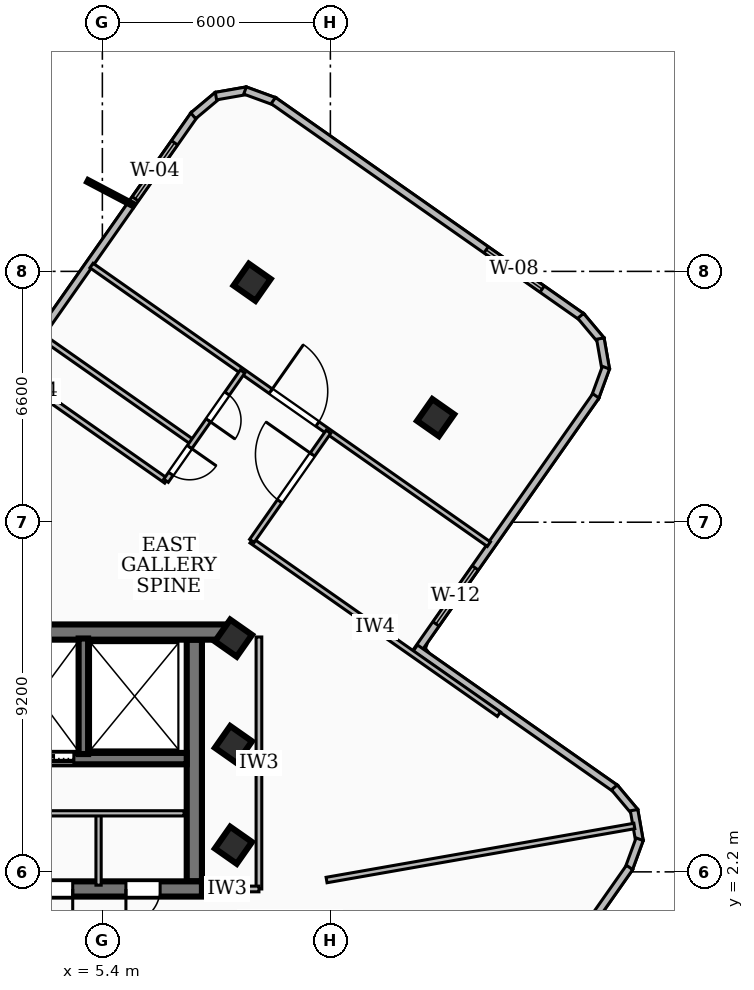
"""IFC4 building model, lengths in metres.
Left out: names, types, materials, properties, quantities, classifications, styles, units other than length and angle.
Written with IfcOpenShell. Run it as: python <this file> out.ifc"""

import sys

from ifc_helpers import new_model, si_unit, direction, frame, frame_2d, origin, origin_2d, place, context, subcontext, project, spatial, rectangle, extrude, element, fill, save


model = new_model("IFC4")
c1 = context("Model", 3, precision=1e-05, world=origin(), true_north=direction((0.0, 1.0)))
c2 = subcontext(c1, "Body", "Model", "MODEL_VIEW")
j1 = project(units=[si_unit("LENGTHUNIT", "METRE"), si_unit("PLANEANGLEUNIT", "RADIAN")], contexts=[c1])
p1 = place(None, origin())
s1 = spatial("IfcSite", under=j1, at=p1, CompositionType="ELEMENT")
p2 = place(p1, origin())
s2 = spatial("IfcBuilding", under=s1, at=p2, CompositionType="ELEMENT")
p3 = place(p2, frame((0.0, 0.0, 264.6)))
s3 = spatial("IfcBuildingStorey", under=s2, at=p3, CompositionType="ELEMENT", Elevation=264.6)
p4 = place(p3, frame((-8.78, 8.51, 0.0), z_axis=(0.0, 0.0, 1.0), x_axis=(1.0, 0.0, 0.0)))
e1 = element("IfcWall", 1, at=p4, inside=s3, PredefinedType="SHEAR", context=c2, shape_type="SweptSolid", body=[
    extrude(rectangle(XDim=17.56, YDim=0.4, at=frame_2d((8.78, 0.0))), origin(), (0.0, 0.0, 1.0), 3.16),
])
p5 = place(p3, frame((8.02, 1.75, 0.0), z_axis=(0.0, 0.0, 1.0), x_axis=(-1.0, 0.0, 0.0)))
e2 = element("IfcWall", 2, at=p5, inside=s3, PredefinedType="SHEAR", context=c2, shape_type="SweptSolid", body=[
    extrude(rectangle(XDim=16.04, YDim=0.4, at=frame_2d((8.02, 0.0))), origin(), (0.0, 0.0, 1.0), 3.16),
])
p6 = place(p5, frame((7.45, 0.0, 0.0)))
e3 = element("IfcOpeningElement", 3, at=p6, cuts=e2, PredefinedType="OPENING", context=c2, shape_type="SweptSolid", body=[
    extrude(rectangle(XDim=1.0, YDim=2.1, at=frame_2d((0.5, 1.05))), frame((0.0, 0.21, 0.0), z_axis=(0.0, -1.0, 0.0), x_axis=(1.0, 0.0, 0.0)), (0.0, 0.0, 1.0), 0.42),
])
p7 = place(p5, frame((14.285, 0.0, 0.0)))
e4 = element("IfcOpeningElement", 4, at=p7, cuts=e2, PredefinedType="OPENING", context=c2, shape_type="SweptSolid", body=[
    extrude(rectangle(XDim=1.05, YDim=2.15, at=frame_2d((0.525, 1.075))), frame((0.0, 0.21, 0.0), z_axis=(0.0, -1.0, 0.0), x_axis=(1.0, 0.0, 0.0)), (0.0, 0.0, 1.0), 0.42),
])
p8 = place(p5, frame((12.725, 0.0, 0.0)))
e5 = element("IfcOpeningElement", 5, at=p8, cuts=e2, PredefinedType="OPENING", context=c2, shape_type="SweptSolid", body=[
    extrude(rectangle(XDim=1.05, YDim=2.15, at=frame_2d((0.525, 1.075))), frame((0.0, 0.21, 0.0), z_axis=(0.0, -1.0, 0.0), x_axis=(1.0, 0.0, 0.0)), (0.0, 0.0, 1.0), 0.42),
])
p9 = place(p5, frame((11.165, 0.0, 0.0)))
e6 = element("IfcOpeningElement", 6, at=p9, cuts=e2, PredefinedType="OPENING", context=c2, shape_type="SweptSolid", body=[
    extrude(rectangle(XDim=1.05, YDim=2.15, at=frame_2d((0.525, 1.075))), frame((0.0, 0.21, 0.0), z_axis=(0.0, -1.0, 0.0), x_axis=(1.0, 0.0, 0.0)), (0.0, 0.0, 1.0), 0.42),
])
p10 = place(p5, frame((3.4, 0.0, 0.0)))
e7 = element("IfcOpeningElement", 7, at=p10, cuts=e2, PredefinedType="OPENING", context=c2, shape_type="SweptSolid", body=[
    extrude(rectangle(XDim=0.9, YDim=2.06, at=frame_2d((0.45, 1.03))), frame((0.0, 0.21, 0.0), z_axis=(0.0, -1.0, 0.0), x_axis=(1.0, 0.0, 0.0)), (0.0, 0.0, 1.0), 0.42),
])
p11 = place(p5, frame((1.1, 0.0, 0.0)))
e8 = element("IfcOpeningElement", 8, at=p11, cuts=e2, PredefinedType="OPENING", context=c2, shape_type="SweptSolid", body=[
    extrude(rectangle(XDim=0.9, YDim=2.06, at=frame_2d((0.45, 1.03))), frame((0.0, 0.21, 0.0), z_axis=(0.0, -1.0, 0.0), x_axis=(1.0, 0.0, 0.0)), (0.0, 0.0, 1.0), 0.42),
])
p12 = place(p3, frame((7.82, 8.31, 0.0), z_axis=(0.0, 0.0, 1.0), x_axis=(0.0, -1.0, 0.0)))
e9 = element("IfcWall", 9, at=p12, inside=s3, PredefinedType="SHEAR", context=c2, shape_type="SweptSolid", body=[
    extrude(rectangle(XDim=6.36, YDim=0.4, at=frame_2d((3.18, 0.0))), origin(), (0.0, 0.0, 1.0), 3.16),
])
p13 = place(p3, frame((7.62, 5.18, 0.0), z_axis=(0.0, 0.0, 1.0), x_axis=(-1.0, 0.0, 0.0)))
e10 = element("IfcWall", 10, at=p13, inside=s3, PredefinedType="SOLIDWALL", context=c2, shape_type="SweptSolid", body=[
    extrude(rectangle(XDim=15.24, YDim=0.3, at=frame_2d((7.62, 0.0))), origin(), (0.0, 0.0, 1.0), 3.16),
])
p14 = place(p13, frame((5.77, 0.0, 0.0)))
e11 = element("IfcOpeningElement", 11, at=p14, cuts=e10, PredefinedType="OPENING", context=c2, shape_type="SweptSolid", body=[
    extrude(rectangle(XDim=1.1, YDim=2.15, at=frame_2d((0.55, 1.075))), frame((0.0, 0.16, 0.0), z_axis=(0.0, -1.0, 0.0), x_axis=(1.0, 0.0, 0.0)), (0.0, 0.0, 1.0), 0.32),
])
p15 = place(p13, frame((2.97, 0.0, 0.0)))
e12 = element("IfcOpeningElement", 12, at=p15, cuts=e10, PredefinedType="OPENING", context=c2, shape_type="SweptSolid", body=[
    extrude(rectangle(XDim=1.1, YDim=2.15, at=frame_2d((0.55, 1.075))), frame((0.0, 0.16, 0.0), z_axis=(0.0, -1.0, 0.0), x_axis=(1.0, 0.0, 0.0)), (0.0, 0.0, 1.0), 0.32),
])
p16 = place(p13, frame((7.97, 0.0, 0.0)))
e13 = element("IfcOpeningElement", 13, at=p16, cuts=e10, PredefinedType="OPENING", context=c2, shape_type="SweptSolid", body=[
    extrude(rectangle(XDim=1.0, YDim=2.1, at=frame_2d((0.5, 1.05))), frame((0.0, 0.16, 0.0), z_axis=(0.0, -1.0, 0.0), x_axis=(1.0, 0.0, 0.0)), (0.0, 0.0, 1.0), 0.32),
])
p17 = place(p3, frame((4.9, 5.3, 0.0), z_axis=(0.0, 0.0, 1.0), x_axis=(0.0, 1.0, 0.0)))
e14 = element("IfcWall", 14, at=p17, inside=s3, PredefinedType="SOLIDWALL", context=c2, shape_type="SweptSolid", body=[
    extrude(rectangle(XDim=3.04, YDim=0.25, at=frame_2d((1.52, 0.0))), origin(), (0.0, 0.0, 1.0), 3.16),
])
for number, where, z_axis, x_axis in (
    (15, (8.85, 2.9, 0.0), (0.0, 0.0, 1.0), (0.574, 0.819, 0.0)),
    (16, (8.85, 5.55, 0.0), (0.0, 0.0, 1.0), (0.574, 0.819, 0.0)),
    (17, (8.85, 8.35, 0.0), (0.0, 0.0, 1.0), (0.574, 0.819, 0.0)),
    (18, (14.169, 14.152, 0.0), (0.0, 0.0, 1.0), (0.574, 0.819, 0.0)),
    (19, (9.341, 17.714, 0.0), (0.0, 0.0, 1.0), (0.574, 0.819, 0.0)),
):
    element("IfcColumn", number, at=place(p3, frame(where, z_axis=z_axis, x_axis=x_axis)), inside=s3, PredefinedType="COLUMN", context=c2, shape_type="SweptSolid", body=[
        extrude(rectangle(XDim=0.7, YDim=0.7, at=origin_2d()), origin(), (0.0, 0.0, 1.0), 3.42),
    ])
p18 = place(p3, frame((3.092, 15.383, 0.0), z_axis=(0.0, 0.0, 1.0), x_axis=(0.574207723227, 0.818709649746, 0.0)))
e20 = element("IfcWall", 20, at=p18, inside=s3, PredefinedType="SOLIDWALL", context=c2, shape_type="SweptSolid", body=[
    extrude(rectangle(XDim=8.241, YDim=0.2, at=frame_2d((4.12, 0.0))), origin(), (0.0, 0.0, 1.0), 3.16),
])
p19 = place(p18, frame((5.528, 0.0, 0.85)))
e21 = element("IfcOpeningElement", 21, at=p19, cuts=e20, PredefinedType="OPENING", context=c2, shape_type="SweptSolid", body=[
    extrude(rectangle(XDim=1.8, YDim=2.0, at=frame_2d((0.9, 1.0))), frame((0.0, 0.11, 0.0), z_axis=(0.0, -1.0, 0.0), x_axis=(1.0, 0.0, 0.0)), (0.0, 0.0, 1.0), 0.22),
])
p20 = place(p3, frame((7.791, 22.094, 0.0), z_axis=(0.0, 0.0, 1.0), x_axis=(0.766450684477, 0.642303159159, 0.0)))
e22 = element("IfcWall", 22, at=p20, inside=s3, PredefinedType="SOLIDWALL", context=c2, shape_type="SweptSolid", body=[
    extrude(rectangle(XDim=0.838, YDim=0.2, at=frame_2d((0.419, 0.0))), origin(), (0.0, 0.0, 1.0), 3.16),
])
p21 = place(p3, frame((8.389, 22.612, 0.0), z_axis=(0.0, 0.0, 1.0), x_axis=(0.985118245285, 0.171877988141, 0.0)))
e23 = element("IfcWall", 23, at=p21, inside=s3, PredefinedType="SOLIDWALL", context=c2, shape_type="SweptSolid", body=[
    extrude(rectangle(XDim=0.825, YDim=0.2, at=frame_2d((0.413, 0.0))), origin(), (0.0, 0.0, 1.0), 3.16),
])
p22 = place(p3, frame((9.154, 22.759, 0.0), z_axis=(0.0, 0.0, 1.0), x_axis=(0.939042573482, -0.343800880145, 0.0)))
e24 = element("IfcWall", 24, at=p22, inside=s3, PredefinedType="SOLIDWALL", context=c2, shape_type="SweptSolid", body=[
    extrude(rectangle(XDim=0.838, YDim=0.2, at=frame_2d((0.419, 0.0))), origin(), (0.0, 0.0, 1.0), 3.16),
])
p23 = place(p3, frame((9.898, 22.494, 0.0), z_axis=(0.0, 0.0, 1.0), x_axis=(0.818760017785, -0.5741359014, 0.0)))
e25 = element("IfcWall", 25, at=p23, inside=s3, PredefinedType="SOLIDWALL", context=c2, shape_type="SweptSolid", body=[
    extrude(rectangle(XDim=9.922, YDim=0.2, at=frame_2d((4.961, 0.0))), origin(), (0.0, 0.0, 1.0), 3.16),
])
p24 = place(p23, frame((6.84, 0.0, 0.85)))
e26 = element("IfcOpeningElement", 26, at=p24, cuts=e25, PredefinedType="OPENING", context=c2, shape_type="SweptSolid", body=[
    extrude(rectangle(XDim=1.8, YDim=1.8, at=frame_2d((0.9, 0.9))), frame((0.0, 0.11, 0.0), z_axis=(0.0, -1.0, 0.0), x_axis=(1.0, 0.0, 0.0)), (0.0, 0.0, 1.0), 0.22),
])
p25 = place(p3, frame((17.986, 16.83, 0.0), z_axis=(0.0, 0.0, 1.0), x_axis=(0.642131913787, -0.766594159446, 0.0)))
e27 = element("IfcWall", 27, at=p25, inside=s3, PredefinedType="SOLIDWALL", context=c2, shape_type="SweptSolid", body=[
    extrude(rectangle(XDim=0.838, YDim=0.2, at=frame_2d((0.419, 0.0))), origin(), (0.0, 0.0, 1.0), 3.16),
])
p26 = place(p3, frame((18.504, 16.232, 0.0), z_axis=(0.0, 0.0, 1.0), x_axis=(0.172165058078, -0.985068115806, 0.0)))
e28 = element("IfcWall", 28, at=p26, inside=s3, PredefinedType="SOLIDWALL", context=c2, shape_type="SweptSolid", body=[
    extrude(rectangle(XDim=0.825, YDim=0.2, at=frame_2d((0.413, 0.0))), origin(), (0.0, 0.0, 1.0), 3.16),
])
p27 = place(p3, frame((18.651, 15.467, 0.0), z_axis=(0.0, 0.0, 1.0), x_axis=(-0.343826172689, -0.939033313027, 0.0)))
e29 = element("IfcWall", 29, at=p27, inside=s3, PredefinedType="SOLIDWALL", context=c2, shape_type="SweptSolid", body=[
    extrude(rectangle(XDim=0.837, YDim=0.2, at=frame_2d((0.418, 0.0))), origin(), (0.0, 0.0, 1.0), 3.16),
])
p28 = place(p3, frame((18.386, 14.724, 0.0), z_axis=(0.0, 0.0, 1.0), x_axis=(-0.574193796103, -0.818719417454, 0.0)))
e30 = element("IfcWall", 30, at=p28, inside=s3, PredefinedType="SOLIDWALL", context=c2, shape_type="SweptSolid", body=[
    extrude(rectangle(XDim=8.241, YDim=0.2, at=frame_2d((4.121, 0.0))), origin(), (0.0, 0.0, 1.0), 3.16),
])
p29 = place(p28, frame((5.528, 0.0, 0.85)))
e31 = element("IfcOpeningElement", 31, at=p29, cuts=e30, PredefinedType="OPENING", context=c2, shape_type="SweptSolid", body=[
    extrude(rectangle(XDim=1.8, YDim=1.6, at=frame_2d((0.9, 0.8))), frame((0.0, 0.11, 0.0), z_axis=(0.0, -1.0, 0.0), x_axis=(1.0, 0.0, 0.0)), (0.0, 0.0, 1.0), 0.22),
])
p30 = place(p3, frame((13.635, 8.088, 0.0), z_axis=(0.0, 0.0, 1.0), x_axis=(0.818654548261, -0.574286279317, 0.0)))
e32 = element("IfcWall", 32, at=p30, inside=s3, PredefinedType="SOLIDWALL", context=c2, shape_type="SweptSolid", body=[
    extrude(rectangle(XDim=6.441, YDim=0.2, at=frame_2d((3.22, 0.0))), origin(), (0.0, 0.0, 1.0), 3.16),
])
p31 = place(p3, frame((18.872, 4.422, 0.0), z_axis=(0.0, 0.0, 1.0), x_axis=(0.642816318642, -0.766020352528, 0.0)))
e33 = element("IfcWall", 33, at=p31, inside=s3, PredefinedType="SOLIDWALL", context=c2, shape_type="SweptSolid", body=[
    extrude(rectangle(XDim=0.838, YDim=0.2, at=frame_2d((0.419, 0.0))), origin(), (0.0, 0.0, 1.0), 3.16),
])
p32 = place(p3, frame((19.391, 3.824, 0.0), z_axis=(0.0, 0.0, 1.0), x_axis=(0.171877988141, -0.985118245285, 0.0)))
e34 = element("IfcWall", 34, at=p32, inside=s3, PredefinedType="SOLIDWALL", context=c2, shape_type="SweptSolid", body=[
    extrude(rectangle(XDim=0.825, YDim=0.2, at=frame_2d((0.413, 0.0))), origin(), (0.0, 0.0, 1.0), 3.16),
])
p33 = place(p3, frame((19.538, 3.059, 0.0), z_axis=(0.0, 0.0, 1.0), x_axis=(-0.344083284363, -0.938939131905, 0.0)))
e35 = element("IfcWall", 35, at=p33, inside=s3, PredefinedType="SOLIDWALL", context=c2, shape_type="SweptSolid", body=[
    extrude(rectangle(XDim=0.837, YDim=0.2, at=frame_2d((0.418, 0.0))), origin(), (0.0, 0.0, 1.0), 3.16),
])
p34 = place(p3, frame((19.273, 2.316, 0.0), z_axis=(0.0, 0.0, 1.0), x_axis=(-0.574227764949, -0.818695592978, 0.0)))
e36 = element("IfcWall", 36, at=p34, inside=s3, PredefinedType="SOLIDWALL", context=c2, shape_type="SweptSolid", body=[
    extrude(rectangle(XDim=6.741, YDim=0.2, at=frame_2d((3.371, 0.0))), origin(), (0.0, 0.0, 1.0), 3.16),
])
p35 = place(p3, frame((2.9, 3.74, 0.0), z_axis=(0.0, 0.0, 1.0), x_axis=(1.0, 0.0, 0.0)))
e37 = element("IfcWall", 37, at=p35, inside=s3, PredefinedType="PARTITIONING", context=c2, shape_type="SweptSolid", body=[
    extrude(rectangle(XDim=4.65, YDim=0.138, at=frame_2d((2.325, 0.0))), origin(), (0.0, 0.0, 1.0), 3.16),
])
p36 = place(p3, frame((5.3, 1.85, 0.0), z_axis=(0.0, 0.0, 1.0), x_axis=(0.0, 1.0, 0.0)))
e38 = element("IfcWall", 38, at=p36, inside=s3, PredefinedType="PARTITIONING", context=c2, shape_type="SweptSolid", body=[
    extrude(rectangle(XDim=1.89, YDim=0.138, at=frame_2d((0.945, 0.0))), origin(), (0.0, 0.0, 1.0), 2.39),
])
p37 = place(p3, frame((9.52, 1.75, 0.0), z_axis=(0.0, 0.0, 1.0), x_axis=(0.0, 1.0, 0.0)))
e39 = element("IfcWall", 39, at=p37, inside=s3, PredefinedType="PARTITIONING", context=c2, shape_type="SweptSolid", body=[
    extrude(rectangle(XDim=6.63, YDim=0.15, at=frame_2d((3.315, 0.0))), origin(), (0.0, 0.0, 1.0), 3.16),
])
p38 = place(p3, frame((7.85, 1.75, 0.0), z_axis=(0.0, 0.0, 1.0), x_axis=(1.0, 0.0, 0.0)))
e40 = element("IfcWall", 40, at=p38, inside=s3, PredefinedType="PARTITIONING", context=c2, shape_type="SweptSolid", body=[
    extrude(rectangle(XDim=1.67, YDim=0.15, at=frame_2d((0.835, 0.0))), origin(), (0.0, 0.0, 1.0), 2.39),
])
p39 = place(p3, frame((11.3, 1.985, 0.0), z_axis=(0.0, 0.0, 1.0), x_axis=(0.984932365377, 0.172939976965, 0.0)))
e41 = element("IfcWall", 41, at=p39, inside=s3, PredefinedType="PARTITIONING", context=c2, shape_type="SweptSolid", body=[
    extrude(rectangle(XDim=8.222, YDim=0.145, at=frame_2d((4.111, 0.0))), origin(), (0.0, 0.0, 1.0), 3.16),
])
p40 = place(p3, frame((7.083, 12.487, 0.0), z_axis=(0.0, 0.0, 1.0), x_axis=(-0.818818791344, 0.574052076855, 0.0)))
e42 = element("IfcWall", 42, at=p40, inside=s3, PredefinedType="PARTITIONING", context=c2, shape_type="SweptSolid", body=[
    extrude(rectangle(XDim=8.25, YDim=0.145, at=frame_2d((4.125, 0.0))), origin(), (0.0, 0.0, 1.0), 3.16),
])
p41 = place(p3, frame((15.835, 6.349, 0.0), z_axis=(0.0, 0.0, 1.0), x_axis=(-0.818780073776, 0.57410729902, 0.0)))
e43 = element("IfcWall", 43, at=p41, inside=s3, PredefinedType="PARTITIONING", context=c2, shape_type="SweptSolid", body=[
    extrude(rectangle(XDim=7.95, YDim=0.145, at=frame_2d((3.975, 0.0))), origin(), (0.0, 0.0, 1.0), 2.53),
])
p42 = place(p3, frame((7.765, 13.511, 0.0), z_axis=(0.0, 0.0, 1.0), x_axis=(-0.818761977847, 0.574133106198, 0.0)))
e44 = element("IfcWall", 44, at=p42, inside=s3, PredefinedType="PARTITIONING", context=c2, shape_type="SweptSolid", body=[
    extrude(rectangle(XDim=4.835, YDim=0.145, at=frame_2d((2.418, 0.0))), origin(), (0.0, 0.0, 1.0), 3.16),
])
p43 = place(p3, frame((9.09, 15.366, 0.0), z_axis=(0.0, 0.0, 1.0), x_axis=(-0.574097025606, -0.81878727713, 0.0)))
e45 = element("IfcWall", 45, at=p43, inside=s3, PredefinedType="PARTITIONING", context=c2, shape_type="SweptSolid", body=[
    extrude(rectangle(XDim=3.51, YDim=0.145, at=frame_2d((1.755, 0.0))), origin(), (0.0, 0.0, 1.0), 3.16),
])
p44 = place(p43, frame((2.43, 0.0, 0.0)))
e46 = element("IfcOpeningElement", 46, at=p44, cuts=e45, PredefinedType="OPENING", context=c2, shape_type="SweptSolid", body=[
    extrude(rectangle(XDim=0.86, YDim=2.04, at=frame_2d((0.43, 1.02))), frame((0.0, 0.083, 0.0), z_axis=(0.0, -1.0, 0.0), x_axis=(1.0, 0.0, 0.0)), (0.0, 0.0, 1.0), 0.165),
])
p45 = place(p43, frame((0.71, 0.0, 0.0)))
e47 = element("IfcOpeningElement", 47, at=p45, cuts=e45, PredefinedType="OPENING", context=c2, shape_type="SweptSolid", body=[
    extrude(rectangle(XDim=0.86, YDim=2.04, at=frame_2d((0.43, 1.02))), frame((0.0, 0.083, 0.0), z_axis=(0.0, -1.0, 0.0), x_axis=(1.0, 0.0, 0.0)), (0.0, 0.0, 1.0), 0.165),
])
p46 = place(p3, frame((9.334, 10.908, 0.0), z_axis=(0.0, 0.0, 1.0), x_axis=(0.574414301793, 0.818564725539, 0.0)))
e48 = element("IfcWall", 48, at=p46, inside=s3, PredefinedType="PARTITIONING", context=c2, shape_type="SweptSolid", body=[
    extrude(rectangle(XDim=3.51, YDim=0.145, at=frame_2d((1.755, 0.0))), origin(), (0.0, 0.0, 1.0), 3.16),
])
p47 = place(p46, frame((1.275, 0.0, 0.0)))
e49 = element("IfcOpeningElement", 49, at=p47, cuts=e48, PredefinedType="OPENING", context=c2, shape_type="SweptSolid", body=[
    extrude(rectangle(XDim=1.5, YDim=2.12, at=frame_2d((0.75, 1.06))), frame((0.0, 0.083, 0.0), z_axis=(0.0, -1.0, 0.0), x_axis=(1.0, 0.0, 0.0)), (0.0, 0.0, 1.0), 0.165),
])
p48 = place(p3, frame((5.115, 18.154, 0.0), z_axis=(0.0, 0.0, 1.0), x_axis=(0.818735813326, -0.574170417191, 0.0)))
e50 = element("IfcWall", 50, at=p48, inside=s3, PredefinedType="PARTITIONING", context=c2, shape_type="SweptSolid", body=[
    extrude(rectangle(XDim=12.77, YDim=0.145, at=frame_2d((6.385, 0.0))), origin(), (0.0, 0.0, 1.0), 2.53),
])
p49 = place(p48, frame((5.76, 0.0, 0.0)))
e51 = element("IfcOpeningElement", 51, at=p49, cuts=e50, PredefinedType="OPENING", context=c2, shape_type="SweptSolid", body=[
    extrude(rectangle(XDim=1.5, YDim=2.12, at=frame_2d((0.75, 1.06))), frame((0.0, 0.083, 0.0), z_axis=(0.0, -1.0, 0.0), x_axis=(1.0, 0.0, 0.0)), (0.0, 0.0, 1.0), 0.165),
])
p50 = place(p19, origin())
e52 = element("IfcWindow", 52, at=p50, inside=s3, PartitioningType="SINGLE_PANEL", PredefinedType="WINDOW", context=c2, shape_type="SweptSolid", body=[
    extrude(rectangle(XDim=1.8, YDim=2.0, at=frame_2d((0.9, 1.0))), frame((0.0, 0.03, 0.0), z_axis=(0.0, -1.0, 0.0), x_axis=(1.0, 0.0, 0.0)), (0.0, 0.0, 1.0), 0.06),
])
fill(e21, e52)
p51 = place(p24, origin())
e53 = element("IfcWindow", 53, at=p51, inside=s3, PartitioningType="SINGLE_PANEL", PredefinedType="WINDOW", context=c2, shape_type="SweptSolid", body=[
    extrude(rectangle(XDim=1.8, YDim=1.8, at=frame_2d((0.9, 0.9))), frame((0.0, 0.03, 0.0), z_axis=(0.0, -1.0, 0.0), x_axis=(1.0, 0.0, 0.0)), (0.0, 0.0, 1.0), 0.06),
])
fill(e26, e53)
p52 = place(p29, origin())
e54 = element("IfcWindow", 54, at=p52, inside=s3, PartitioningType="SINGLE_PANEL", PredefinedType="WINDOW", context=c2, shape_type="SweptSolid", body=[
    extrude(rectangle(XDim=1.8, YDim=1.6, at=frame_2d((0.9, 0.8))), frame((0.0, 0.03, 0.0), z_axis=(0.0, -1.0, 0.0), x_axis=(1.0, 0.0, 0.0)), (0.0, 0.0, 1.0), 0.06),
])
fill(e31, e54)
p53 = place(p15, origin())
e55 = element("IfcDoor", 55, at=p53, inside=s3, OperationType="DOUBLE_DOOR_SLIDING", PredefinedType="DOOR", context=c2, shape_type="SweptSolid", body=[
    extrude(rectangle(XDim=1.1, YDim=2.15, at=frame_2d((0.55, 1.075))), frame((0.0, 0.025, 0.0), z_axis=(0.0, -1.0, 0.0), x_axis=(1.0, 0.0, 0.0)), (0.0, 0.0, 1.0), 0.05),
])
fill(e12, e55)
p54 = place(p10, origin())
e56 = element("IfcDoor", 56, at=p54, inside=s3, OperationType="SINGLE_SWING_LEFT", PredefinedType="DOOR", context=c2, shape_type="SweptSolid", body=[
    extrude(rectangle(XDim=0.9, YDim=2.06, at=frame_2d((0.45, 1.03))), frame((0.0, 0.025, 0.0), z_axis=(0.0, -1.0, 0.0), x_axis=(1.0, 0.0, 0.0)), (0.0, 0.0, 1.0), 0.05),
])
fill(e7, e56)
p55 = place(p11, origin())
e57 = element("IfcDoor", 57, at=p55, inside=s3, OperationType="SINGLE_SWING_RIGHT", PredefinedType="DOOR", context=c2, shape_type="SweptSolid", body=[
    extrude(rectangle(XDim=0.9, YDim=2.06, at=frame_2d((0.45, 1.03))), frame((0.0, 0.025, 0.0), z_axis=(0.0, -1.0, 0.0), x_axis=(1.0, 0.0, 0.0)), (0.0, 0.0, 1.0), 0.05),
])
fill(e8, e57)
p56 = place(p44, origin())
e58 = element("IfcDoor", 58, at=p56, inside=s3, OperationType="SINGLE_SWING_LEFT", PredefinedType="DOOR", context=c2, shape_type="SweptSolid", body=[
    extrude(rectangle(XDim=0.86, YDim=2.04, at=frame_2d((0.43, 1.02))), frame((0.0, 0.025, 0.0), z_axis=(0.0, -1.0, 0.0), x_axis=(1.0, 0.0, 0.0)), (0.0, 0.0, 1.0), 0.05),
])
fill(e46, e58)
p57 = place(p45, origin())
e59 = element("IfcDoor", 59, at=p57, inside=s3, OperationType="SINGLE_SWING_RIGHT", PredefinedType="DOOR", context=c2, shape_type="SweptSolid", body=[
    extrude(rectangle(XDim=0.86, YDim=2.04, at=frame_2d((0.43, 1.02))), frame((0.0, 0.025, 0.0), z_axis=(0.0, -1.0, 0.0), x_axis=(1.0, 0.0, 0.0)), (0.0, 0.0, 1.0), 0.05),
])
fill(e47, e59)
p58 = place(p47, origin())
e60 = element("IfcDoor", 60, at=p58, inside=s3, OperationType="SINGLE_SWING_RIGHT", PredefinedType="DOOR", context=c2, shape_type="SweptSolid", body=[
    extrude(rectangle(XDim=1.5, YDim=2.12, at=frame_2d((0.75, 1.06))), frame((0.0, 0.025, 0.0), z_axis=(0.0, -1.0, 0.0), x_axis=(1.0, 0.0, 0.0)), (0.0, 0.0, 1.0), 0.05),
])
fill(e49, e60)
p59 = place(p49, origin())
e61 = element("IfcDoor", 61, at=p59, inside=s3, OperationType="SINGLE_SWING_LEFT", PredefinedType="DOOR", context=c2, shape_type="SweptSolid", body=[
    extrude(rectangle(XDim=1.5, YDim=2.12, at=frame_2d((0.75, 1.06))), frame((0.0, 0.025, 0.0), z_axis=(0.0, -1.0, 0.0), x_axis=(1.0, 0.0, 0.0)), (0.0, 0.0, 1.0), 0.05),
])
fill(e51, e61)
save(model, sys.argv[1])
